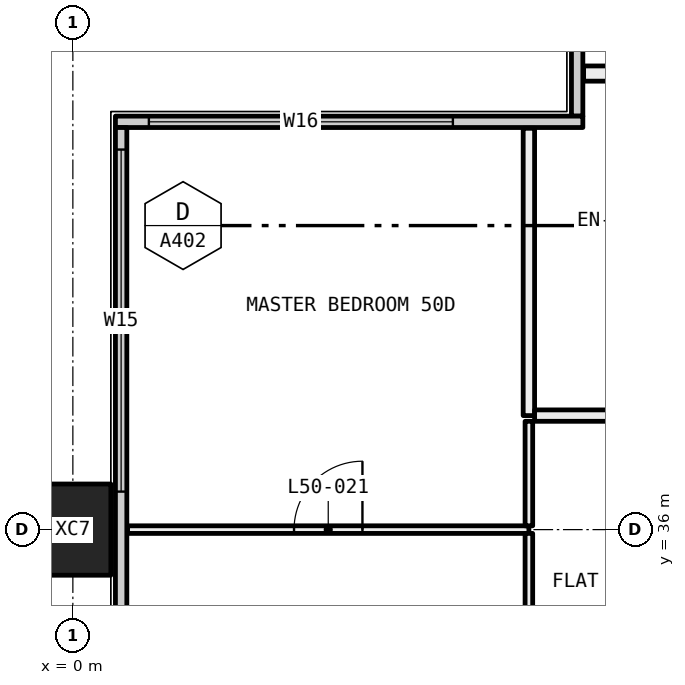
"""IFC4 building model, lengths in metres.
Left out: names, types, materials, properties, quantities, classifications, styles, units other than length and angle.
Written with IfcOpenShell. Run it as: python <this file> out.ifc"""

import sys

from ifc_helpers import new_model, si_unit, direction, frame, frame_2d, origin, origin_2d, place, context, subcontext, project, spatial, rectangle, hollow_rectangle, extrude, element, fill, save


model = new_model("IFC4")
c1 = context("Model", 3, precision=1e-05, world=origin(), true_north=direction((0.0, 1.0)))
c2 = subcontext(c1, "Body", "Model", "MODEL_VIEW")
j1 = project(units=[si_unit("LENGTHUNIT", "METRE"), si_unit("PLANEANGLEUNIT", "RADIAN")], contexts=[c1])
p1 = place(None, origin())
s1 = spatial("IfcSite", under=j1, at=p1, CompositionType="ELEMENT")
p2 = place(p1, origin())
s2 = spatial("IfcBuilding", under=s1, at=p2, CompositionType="ELEMENT")
p3 = place(p2, frame((0.0, 0.0, 189.3)))
s3 = spatial("IfcBuildingStorey", under=s2, at=p3, CompositionType="ELEMENT", Elevation=189.3)
p4 = place(p3, frame((0.0, 36.0, -0.4), z_axis=(0.0, 0.0, 1.0), x_axis=(0.0, 1.0, 0.0)))
e1 = element("IfcColumn", 1, at=p4, inside=s3, PredefinedType="COLUMN", context=c2, shape_type="SweptSolid", body=[
    extrude(hollow_rectangle(XDim=1.2, YDim=1.0, WallThickness=0.045, at=origin_2d()), origin(), (0.0, 0.0, 1.0), 3.45),
])
p5 = place(p3, frame((6.635, 41.44, 0.0), z_axis=(0.0, 0.0, 1.0), x_axis=(0.0, 1.0, 0.0)))
e2 = element("IfcWall", 2, at=p5, inside=s3, PredefinedType="ELEMENTEDWALL", context=c2, shape_type="SweptSolid", body=[
    extrude(rectangle(XDim=5.85, YDim=0.15, at=frame_2d((2.925, 0.0))), origin(), (0.0, 0.0, 1.0), 3.05),
])
p6 = place(p5, frame((1.56, 0.0, 0.45)))
e3 = element("IfcOpeningElement", 3, at=p6, cuts=e2, PredefinedType="OPENING", context=c2, shape_type="SweptSolid", body=[
    extrude(rectangle(XDim=4.0, YDim=2.55, at=frame_2d((2.0, 1.275))), frame((0.0, 0.085, 0.0), z_axis=(0.0, -1.0, 0.0), x_axis=(1.0, 0.0, 0.0)), (0.0, 0.0, 1.0), 0.17),
])
p7 = place(p3, frame((0.56, 41.365, 0.0), z_axis=(0.0, 0.0, 1.0), x_axis=(1.0, 0.0, 0.0)))
e4 = element("IfcWall", 4, at=p7, inside=s3, PredefinedType="ELEMENTEDWALL", context=c2, shape_type="SweptSolid", body=[
    extrude(rectangle(XDim=6.15, YDim=0.15, at=frame_2d((3.075, 0.0))), origin(), (0.0, 0.0, 1.0), 3.05),
])
p8 = place(p7, frame((0.44, 0.0, 0.45)))
e5 = element("IfcOpeningElement", 5, at=p8, cuts=e4, PredefinedType="OPENING", context=c2, shape_type="SweptSolid", body=[
    extrude(rectangle(XDim=4.0, YDim=2.55, at=frame_2d((2.0, 1.275))), frame((0.0, 0.085, 0.0), z_axis=(0.0, -1.0, 0.0), x_axis=(1.0, 0.0, 0.0)), (0.0, 0.0, 1.0), 0.17),
])
p9 = place(p3, frame((0.635, 18.71, 0.0), z_axis=(0.0, 0.0, 1.0), x_axis=(0.0, 1.0, 0.0)))
e6 = element("IfcWall", 6, at=p9, inside=s3, PredefinedType="ELEMENTEDWALL", context=c2, shape_type="SweptSolid", body=[
    extrude(rectangle(XDim=22.58, YDim=0.15, at=frame_2d((11.29, 0.0))), origin(), (0.0, 0.0, 1.0), 3.05),
])
p10 = place(p9, frame((0.29, 0.0, 0.45)))
e7 = element("IfcOpeningElement", 7, at=p10, cuts=e6, PredefinedType="OPENING", context=c2, shape_type="SweptSolid", body=[
    extrude(rectangle(XDim=4.5, YDim=2.55, at=frame_2d((2.25, 1.275))), frame((0.0, 0.085, 0.0), z_axis=(0.0, -1.0, 0.0), x_axis=(1.0, 0.0, 0.0)), (0.0, 0.0, 1.0), 0.17),
])
p11 = place(p9, frame((7.54, 0.0, 0.45)))
e8 = element("IfcOpeningElement", 8, at=p11, cuts=e6, PredefinedType="OPENING", context=c2, shape_type="SweptSolid", body=[
    extrude(rectangle(XDim=3.25, YDim=2.55, at=frame_2d((1.625, 1.275))), frame((0.0, 0.085, 0.0), z_axis=(0.0, -1.0, 0.0), x_axis=(1.0, 0.0, 0.0)), (0.0, 0.0, 1.0), 0.17),
])
p12 = place(p9, frame((11.79, 0.0, 0.45)))
e9 = element("IfcOpeningElement", 9, at=p12, cuts=e6, PredefinedType="OPENING", context=c2, shape_type="SweptSolid", body=[
    extrude(rectangle(XDim=2.0, YDim=2.55, at=frame_2d((1.0, 1.275))), frame((0.0, 0.085, 0.0), z_axis=(0.0, -1.0, 0.0), x_axis=(1.0, 0.0, 0.0)), (0.0, 0.0, 1.0), 0.17),
])
p13 = place(p9, frame((17.79, 0.0, 0.45)))
e10 = element("IfcOpeningElement", 10, at=p13, cuts=e6, PredefinedType="OPENING", context=c2, shape_type="SweptSolid", body=[
    extrude(rectangle(XDim=4.5, YDim=2.55, at=frame_2d((2.25, 1.275))), frame((0.0, 0.085, 0.0), z_axis=(0.0, -1.0, 0.0), x_axis=(1.0, 0.0, 0.0)), (0.0, 0.0, 1.0), 0.17),
])
p14 = place(p3, frame((6.72, 42.0, 0.0), z_axis=(0.0, 0.0, 1.0), x_axis=(1.0, 0.0, 0.0)))
e11 = element("IfcWall", 11, at=p14, inside=s3, PredefinedType="PARTITIONING", context=c2, shape_type="SweptSolid", body=[
    extrude(rectangle(XDim=3.38, YDim=0.2, at=frame_2d((1.69, 0.0))), origin(), (0.0, 0.0, 1.0), 3.05),
])
p15 = place(p3, frame((6.0, 36.0, 0.0), z_axis=(0.0, 0.0, 1.0), x_axis=(-1.0, 0.0, 0.0)))
e12 = element("IfcWall", 12, at=p15, inside=s3, PredefinedType="PARTITIONING", context=c2, shape_type="SweptSolid", body=[
    extrude(rectangle(XDim=5.28, YDim=0.1, at=frame_2d((2.64, 0.0))), origin(), (0.0, 0.0, 1.0), 2.45),
])
p16 = place(p15, frame((2.19, 0.0, 0.0)))
e13 = element("IfcOpeningElement", 13, at=p16, cuts=e12, PredefinedType="OPENING", context=c2, shape_type="SweptSolid", body=[
    extrude(rectangle(XDim=0.9, YDim=2.1, at=frame_2d((0.45, 1.05))), frame((0.0, 0.06, 0.0), z_axis=(0.0, -1.0, 0.0), x_axis=(1.0, 0.0, 0.0)), (0.0, 0.0, 1.0), 0.12),
])
p17 = place(p3, frame((6.0, 33.0, 0.0), z_axis=(0.0, 0.0, 1.0), x_axis=(0.0, 1.0, 0.0)))
e14 = element("IfcWall", 14, at=p17, inside=s3, PredefinedType="PARTITIONING", context=c2, shape_type="SweptSolid", body=[
    extrude(rectangle(XDim=2.95, YDim=0.1, at=frame_2d((1.475, 0.0))), origin(), (0.0, 0.0, 1.0), 2.45),
])
p18 = place(p17, frame((1.025, 0.0, 0.0)))
e15 = element("IfcOpeningElement", 15, at=p18, cuts=e14, PredefinedType="OPENING", context=c2, shape_type="SweptSolid", body=[
    extrude(rectangle(XDim=0.9, YDim=2.1, at=frame_2d((0.45, 1.05))), frame((0.0, 0.06, 0.0), z_axis=(0.0, -1.0, 0.0), x_axis=(1.0, 0.0, 0.0)), (0.0, 0.0, 1.0), 0.12),
])
p19 = place(p3, frame((6.0, 36.05, 0.0), z_axis=(0.0, 0.0, 1.0), x_axis=(0.0, 1.0, 0.0)))
e16 = element("IfcWall", 16, at=p19, inside=s3, PredefinedType="PARTITIONING", context=c2, shape_type="SweptSolid", body=[
    extrude(rectangle(XDim=1.375, YDim=0.1, at=frame_2d((0.688, 0.0))), origin(), (0.0, 0.0, 1.0), 2.45),
])
p20 = place(p3, frame((6.0, 37.5, 0.0), z_axis=(0.0, 0.0, 1.0), x_axis=(0.0, 1.0, 0.0)))
e17 = element("IfcWall", 17, at=p20, inside=s3, PredefinedType="PARTITIONING", context=c2, shape_type="SweptSolid", body=[
    extrude(rectangle(XDim=3.78, YDim=0.15, at=frame_2d((1.89, 0.0))), origin(), (0.0, 0.0, 1.0), 3.05),
])
p21 = place(p3, frame((10.0, 37.5, 0.0), z_axis=(0.0, 0.0, 1.0), x_axis=(-1.0, 0.0, 0.0)))
e18 = element("IfcWall", 18, at=p21, inside=s3, PredefinedType="PARTITIONING", context=c2, shape_type="SweptSolid", body=[
    extrude(rectangle(XDim=3.925, YDim=0.15, at=frame_2d((1.962, 0.0))), origin(), (0.0, 0.0, 1.0), 3.05),
])
p22 = place(p21, frame((1.512, 0.0, 0.0)))
e19 = element("IfcOpeningElement", 19, at=p22, cuts=e18, PredefinedType="OPENING", context=c2, shape_type="SweptSolid", body=[
    extrude(rectangle(XDim=0.9, YDim=2.1, at=frame_2d((0.45, 1.05))), frame((0.0, 0.085, 0.0), z_axis=(0.0, -1.0, 0.0), x_axis=(1.0, 0.0, 0.0)), (0.0, 0.0, 1.0), 0.17),
])
p23 = place(p8, origin())
e20 = element("IfcWindow", 20, at=p23, inside=s3, PartitioningType="SINGLE_PANEL", PredefinedType="WINDOW", context=c2, shape_type="SweptSolid", body=[
    extrude(rectangle(XDim=4.0, YDim=2.55, at=frame_2d((2.0, 1.275))), frame((0.0, 0.03, 0.0), z_axis=(0.0, -1.0, 0.0), x_axis=(1.0, 0.0, 0.0)), (0.0, 0.0, 1.0), 0.06),
])
fill(e5, e20)
p24 = place(p13, origin())
e21 = element("IfcWindow", 21, at=p24, inside=s3, PartitioningType="SINGLE_PANEL", PredefinedType="WINDOW", context=c2, shape_type="SweptSolid", body=[
    extrude(rectangle(XDim=4.5, YDim=2.55, at=frame_2d((2.25, 1.275))), frame((0.0, 0.03, 0.0), z_axis=(0.0, -1.0, 0.0), x_axis=(1.0, 0.0, 0.0)), (0.0, 0.0, 1.0), 0.06),
])
fill(e10, e21)
p25 = place(p16, frame((0.9, 0.0, 0.0), x_axis=(-1.0, 0.0, 0.0)))
e22 = element("IfcDoor", 22, at=p25, inside=s3, OperationType="SINGLE_SWING_LEFT", PredefinedType="DOOR", context=c2, shape_type="SweptSolid", body=[
    extrude(rectangle(XDim=0.9, YDim=2.1, at=frame_2d((0.45, 1.05))), frame((0.0, 0.025, 0.0), z_axis=(0.0, -1.0, 0.0), x_axis=(1.0, 0.0, 0.0)), (0.0, 0.0, 1.0), 0.05),
])
fill(e13, e22)
save(model, sys.argv[1])
